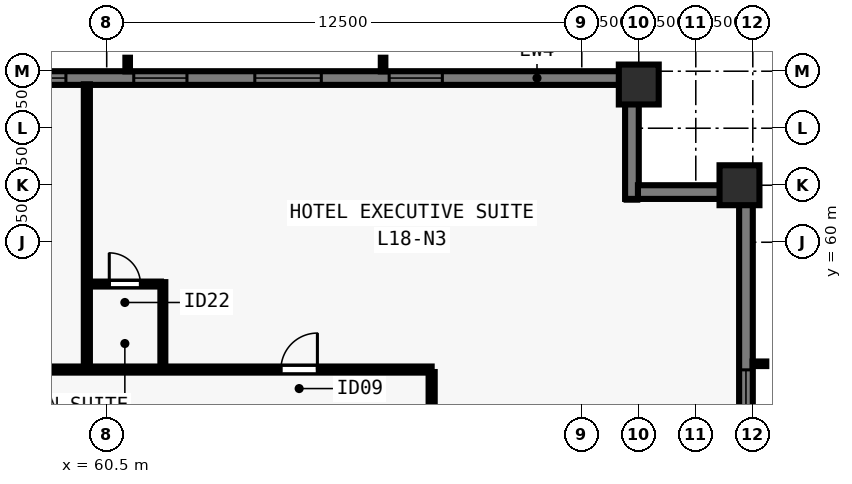
"""IFC4 building model, lengths in metres.
Left out: names, types, materials, properties, quantities, classifications, styles, units other than length and angle.
Written with IfcOpenShell. Run it as: python <this file> out.ifc"""

import sys

from ifc_helpers import new_model, si_unit, direction, frame, frame_2d, origin, origin_2d, place, context, subcontext, project, spatial, rectangle, extrude, element, fill, save


model = new_model("IFC4")
c1 = context("Model", 3, precision=1e-05, world=origin(), true_north=direction((0.0, 1.0)))
c2 = subcontext(c1, "Body", "Model", "MODEL_VIEW")
j1 = project(units=[si_unit("LENGTHUNIT", "METRE"), si_unit("PLANEANGLEUNIT", "RADIAN")], contexts=[c1])
p1 = place(None, origin())
s1 = spatial("IfcSite", under=j1, at=p1, CompositionType="ELEMENT")
p2 = place(p1, origin())
s2 = spatial("IfcBuilding", under=s1, at=p2, CompositionType="ELEMENT")
p3 = place(p2, frame((0.0, 0.0, 69.0)))
s3 = spatial("IfcBuildingStorey", under=s2, at=p3, CompositionType="ELEMENT", Elevation=69.0)
for number, where, z_axis, x_axis in (
    (1, (77.15, 61.5, 0.0), (0.0, 0.0, 1.0), (0.0, 1.0, 0.0)),
    (2, (74.5, 64.15, 0.0), (0.0, 0.0, 1.0), (1.0, 0.0, 0.0)),
):
    element("IfcColumn", number, at=place(p3, frame(where, z_axis=z_axis, x_axis=x_axis)), inside=s3, PredefinedType="COLUMN", context=c2, shape_type="SweptSolid", body=[
        extrude(rectangle(XDim=1.05, YDim=1.05, at=origin_2d()), origin(), (0.0, 0.0, 1.0), 3.5),
    ])
p4 = place(p3, frame((29.5, 64.32, 0.0), z_axis=(0.0, 0.0, 1.0), x_axis=(1.0, 0.0, 0.0)))
e3 = element("IfcWall", 3, at=p4, inside=s3, PredefinedType="SOLIDWALL", context=c2, shape_type="SweptSolid", body=[
    extrude(rectangle(XDim=44.662, YDim=0.36, at=frame_2d((22.331, 0.0))), origin(), (0.0, 0.0, 1.0), 3.28),
])
p5 = place(p4, frame((4.83, 0.0, 0.8)))
e4 = element("IfcOpeningElement", 4, at=p5, cuts=e3, PredefinedType="OPENING", context=c2, shape_type="SweptSolid", body=[
    extrude(rectangle(XDim=1.4, YDim=1.544, at=frame_2d((0.7, 0.772))), frame((0.0, 0.19, 0.0), z_axis=(0.0, -1.0, 0.0), x_axis=(1.0, 0.0, 0.0)), (0.0, 0.0, 1.0), 0.38),
])
p6 = place(p4, frame((8.015, 0.0, 0.8)))
e5 = element("IfcOpeningElement", 5, at=p6, cuts=e3, PredefinedType="OPENING", context=c2, shape_type="SweptSolid", body=[
    extrude(rectangle(XDim=1.75, YDim=1.544, at=frame_2d((0.875, 0.772))), frame((0.0, 0.19, 0.0), z_axis=(0.0, -1.0, 0.0), x_axis=(1.0, 0.0, 0.0)), (0.0, 0.0, 1.0), 0.38),
])
p7 = place(p4, frame((11.551, 0.0, 0.8)))
e6 = element("IfcOpeningElement", 6, at=p7, cuts=e3, PredefinedType="OPENING", context=c2, shape_type="SweptSolid", body=[
    extrude(rectangle(XDim=1.4, YDim=1.544, at=frame_2d((0.7, 0.772))), frame((0.0, 0.19, 0.0), z_axis=(0.0, -1.0, 0.0), x_axis=(1.0, 0.0, 0.0)), (0.0, 0.0, 1.0), 0.38),
])
p8 = place(p4, frame((15.186, 0.0, 0.8)))
e7 = element("IfcOpeningElement", 7, at=p8, cuts=e3, PredefinedType="OPENING", context=c2, shape_type="SweptSolid", body=[
    extrude(rectangle(XDim=1.75, YDim=1.544, at=frame_2d((0.875, 0.772))), frame((0.0, 0.19, 0.0), z_axis=(0.0, -1.0, 0.0), x_axis=(1.0, 0.0, 0.0)), (0.0, 0.0, 1.0), 0.38),
])
p9 = place(p4, frame((18.721, 0.0, 0.8)))
e8 = element("IfcOpeningElement", 8, at=p9, cuts=e3, PredefinedType="OPENING", context=c2, shape_type="SweptSolid", body=[
    extrude(rectangle(XDim=1.4, YDim=1.544, at=frame_2d((0.7, 0.772))), frame((0.0, 0.19, 0.0), z_axis=(0.0, -1.0, 0.0), x_axis=(1.0, 0.0, 0.0)), (0.0, 0.0, 1.0), 0.38),
])
p10 = place(p4, frame((21.456, 0.0, 0.8)))
e9 = element("IfcOpeningElement", 9, at=p10, cuts=e3, PredefinedType="OPENING", context=c2, shape_type="SweptSolid", body=[
    extrude(rectangle(XDim=1.75, YDim=1.544, at=frame_2d((0.875, 0.772))), frame((0.0, 0.19, 0.0), z_axis=(0.0, -1.0, 0.0), x_axis=(1.0, 0.0, 0.0)), (0.0, 0.0, 1.0), 0.38),
])
p11 = place(p4, frame((24.991, 0.0, 0.8)))
e10 = element("IfcOpeningElement", 10, at=p11, cuts=e3, PredefinedType="OPENING", context=c2, shape_type="SweptSolid", body=[
    extrude(rectangle(XDim=1.4, YDim=1.544, at=frame_2d((0.7, 0.772))), frame((0.0, 0.19, 0.0), z_axis=(0.0, -1.0, 0.0), x_axis=(1.0, 0.0, 0.0)), (0.0, 0.0, 1.0), 0.38),
])
p12 = place(p4, frame((28.177, 0.0, 0.8)))
e11 = element("IfcOpeningElement", 11, at=p12, cuts=e3, PredefinedType="OPENING", context=c2, shape_type="SweptSolid", body=[
    extrude(rectangle(XDim=1.75, YDim=1.544, at=frame_2d((0.875, 0.772))), frame((0.0, 0.19, 0.0), z_axis=(0.0, -1.0, 0.0), x_axis=(1.0, 0.0, 0.0)), (0.0, 0.0, 1.0), 0.38),
])
p13 = place(p4, frame((31.711, 0.0, 0.8)))
e12 = element("IfcOpeningElement", 12, at=p13, cuts=e3, PredefinedType="OPENING", context=c2, shape_type="SweptSolid", body=[
    extrude(rectangle(XDim=1.4, YDim=1.544, at=frame_2d((0.7, 0.772))), frame((0.0, 0.19, 0.0), z_axis=(0.0, -1.0, 0.0), x_axis=(1.0, 0.0, 0.0)), (0.0, 0.0, 1.0), 0.38),
])
p14 = place(p4, frame((34.897, 0.0, 0.8)))
e13 = element("IfcOpeningElement", 13, at=p14, cuts=e3, PredefinedType="OPENING", context=c2, shape_type="SweptSolid", body=[
    extrude(rectangle(XDim=1.75, YDim=1.544, at=frame_2d((0.875, 0.772))), frame((0.0, 0.19, 0.0), z_axis=(0.0, -1.0, 0.0), x_axis=(1.0, 0.0, 0.0)), (0.0, 0.0, 1.0), 0.38),
])
p15 = place(p4, frame((38.432, 0.0, 0.8)))
e14 = element("IfcOpeningElement", 14, at=p15, cuts=e3, PredefinedType="OPENING", context=c2, shape_type="SweptSolid", body=[
    extrude(rectangle(XDim=1.4, YDim=1.544, at=frame_2d((0.7, 0.772))), frame((0.0, 0.19, 0.0), z_axis=(0.0, -1.0, 0.0), x_axis=(1.0, 0.0, 0.0)), (0.0, 0.0, 1.0), 0.38),
])
p16 = place(p3, frame((74.32, 64.5, 0.0), z_axis=(0.0, 0.0, 1.0), x_axis=(0.0, -1.0, 0.0)))
e15 = element("IfcWall", 15, at=p16, inside=s3, PredefinedType="SOLIDWALL", context=c2, shape_type="SweptSolid", body=[
    extrude(rectangle(XDim=3.36, YDim=0.36, at=frame_2d((1.68, 0.0))), origin(), (0.0, 0.0, 1.0), 3.28),
])
p17 = place(p3, frame((74.478, 61.32, 0.0), z_axis=(0.0, 0.0, 1.0), x_axis=(1.0, 0.0, 0.0)))
e16 = element("IfcWall", 16, at=p17, inside=s3, PredefinedType="SOLIDWALL", context=c2, shape_type="SweptSolid", body=[
    extrude(rectangle(XDim=2.684, YDim=0.36, at=frame_2d((1.342, 0.0))), origin(), (0.0, 0.0, 1.0), 3.28),
])
p18 = place(p3, frame((77.32, 61.5, 0.0), z_axis=(0.0, 0.0, 1.0), x_axis=(0.0, -1.0, 0.0)))
e17 = element("IfcWall", 17, at=p18, inside=s3, PredefinedType="SOLIDWALL", context=c2, shape_type="SweptSolid", body=[
    extrude(rectangle(XDim=18.762, YDim=0.36, at=frame_2d((9.381, 0.0))), origin(), (0.0, 0.0, 1.0), 3.28),
])
p19 = place(p18, frame((4.858, 0.0, 0.8)))
e18 = element("IfcOpeningElement", 18, at=p19, cuts=e17, PredefinedType="OPENING", context=c2, shape_type="SweptSolid", body=[
    extrude(rectangle(XDim=1.4, YDim=1.544, at=frame_2d((0.7, 0.772))), frame((0.0, 0.19, 0.0), z_axis=(0.0, -1.0, 0.0), x_axis=(1.0, 0.0, 0.0)), (0.0, 0.0, 1.0), 0.38),
])
p20 = place(p18, frame((8.098, 0.0, 0.8)))
e19 = element("IfcOpeningElement", 19, at=p20, cuts=e17, PredefinedType="OPENING", context=c2, shape_type="SweptSolid", body=[
    extrude(rectangle(XDim=1.75, YDim=1.544, at=frame_2d((0.875, 0.772))), frame((0.0, 0.19, 0.0), z_axis=(0.0, -1.0, 0.0), x_axis=(1.0, 0.0, 0.0)), (0.0, 0.0, 1.0), 0.38),
])
p21 = place(p18, frame((11.689, 0.0, 0.8)))
e20 = element("IfcOpeningElement", 20, at=p21, cuts=e17, PredefinedType="OPENING", context=c2, shape_type="SweptSolid", body=[
    extrude(rectangle(XDim=1.4, YDim=1.544, at=frame_2d((0.7, 0.772))), frame((0.0, 0.19, 0.0), z_axis=(0.0, -1.0, 0.0), x_axis=(1.0, 0.0, 0.0)), (0.0, 0.0, 1.0), 0.38),
])
p22 = place(p18, frame((14.929, 0.0, 0.8)))
e21 = element("IfcOpeningElement", 21, at=p22, cuts=e17, PredefinedType="OPENING", context=c2, shape_type="SweptSolid", body=[
    extrude(rectangle(XDim=1.75, YDim=1.544, at=frame_2d((0.875, 0.772))), frame((0.0, 0.19, 0.0), z_axis=(0.0, -1.0, 0.0), x_axis=(1.0, 0.0, 0.0)), (0.0, 0.0, 1.0), 0.38),
])
p23 = place(p3, frame((34.95, 56.65, 0.0), z_axis=(0.0, 0.0, 1.0), x_axis=(1.0, 0.0, 0.0)))
e22 = element("IfcWall", 22, at=p23, inside=s3, PredefinedType="PARTITIONING", context=c2, shape_type="SweptSolid", body=[
    extrude(rectangle(XDim=34.1, YDim=0.16, at=frame_2d((17.05, 0.0))), origin(), (0.0, 0.0, 1.0), 3.28),
])
p24 = place(p23, frame((4.166, 0.0, 0.0)))
e23 = element("IfcOpeningElement", 23, at=p24, cuts=e22, PredefinedType="OPENING", context=c2, shape_type="SweptSolid", body=[
    extrude(rectangle(XDim=0.96, YDim=2.15, at=frame_2d((0.48, 1.075))), frame((0.0, 0.09, 0.0), z_axis=(0.0, -1.0, 0.0), x_axis=(1.0, 0.0, 0.0)), (0.0, 0.0, 1.0), 0.18),
])
p25 = place(p23, frame((17.73, 0.0, 0.0)))
e24 = element("IfcOpeningElement", 24, at=p25, cuts=e22, PredefinedType="OPENING", context=c2, shape_type="SweptSolid", body=[
    extrude(rectangle(XDim=0.96, YDim=2.15, at=frame_2d((0.48, 1.075))), frame((0.0, 0.09, 0.0), z_axis=(0.0, -1.0, 0.0), x_axis=(1.0, 0.0, 0.0)), (0.0, 0.0, 1.0), 0.18),
])
p26 = place(p23, frame((30.134, 0.0, 0.0)))
e25 = element("IfcOpeningElement", 25, at=p26, cuts=e22, PredefinedType="OPENING", context=c2, shape_type="SweptSolid", body=[
    extrude(rectangle(XDim=0.96, YDim=2.15, at=frame_2d((0.48, 1.075))), frame((0.0, 0.09, 0.0), z_axis=(0.0, -1.0, 0.0), x_axis=(1.0, 0.0, 0.0)), (0.0, 0.0, 1.0), 0.18),
])
p27 = place(p3, frame((69.05, 21.415, 0.0), z_axis=(0.0, 0.0, 1.0), x_axis=(0.0, 1.0, 0.0)))
e26 = element("IfcWall", 26, at=p27, inside=s3, PredefinedType="PARTITIONING", context=c2, shape_type="SweptSolid", body=[
    extrude(rectangle(XDim=35.17, YDim=0.16, at=frame_2d((17.585, 0.0))), origin(), (0.0, 0.0, 1.0), 3.28),
])
p28 = place(p27, frame((9.746, 0.0, 0.0)))
e27 = element("IfcOpeningElement", 27, at=p28, cuts=e26, PredefinedType="OPENING", context=c2, shape_type="SweptSolid", body=[
    extrude(rectangle(XDim=0.96, YDim=2.15, at=frame_2d((0.48, 1.075))), frame((0.0, 0.09, 0.0), z_axis=(0.0, -1.0, 0.0), x_axis=(1.0, 0.0, 0.0)), (0.0, 0.0, 1.0), 0.18),
])
p29 = place(p27, frame((27.146, 0.0, 0.0)))
e28 = element("IfcOpeningElement", 28, at=p29, cuts=e26, PredefinedType="OPENING", context=c2, shape_type="SweptSolid", body=[
    extrude(rectangle(XDim=0.96, YDim=2.15, at=frame_2d((0.48, 1.075))), frame((0.0, 0.09, 0.0), z_axis=(0.0, -1.0, 0.0), x_axis=(1.0, 0.0, 0.0)), (0.0, 0.0, 1.0), 0.18),
])
p30 = place(p3, frame((59.978, 56.715, 0.0), z_axis=(0.0, 0.0, 1.0), x_axis=(0.0, 1.0, 0.0)))
e29 = element("IfcWall", 29, at=p30, inside=s3, PredefinedType="PARTITIONING", context=c2, shape_type="SweptSolid", body=[
    extrude(rectangle(XDim=7.44, YDim=0.16, at=frame_2d((3.72, 0.0))), origin(), (0.0, 0.0, 1.0), 3.28),
])
p31 = place(p3, frame((61.978, 56.715, 0.0), z_axis=(0.0, 0.0, 1.0), x_axis=(0.0, 1.0, 0.0)))
e30 = element("IfcWall", 30, at=p31, inside=s3, PredefinedType="PLUMBINGWALL", context=c2, shape_type="SweptSolid", body=[
    extrude(rectangle(XDim=2.235, YDim=0.13, at=frame_2d((1.117, 0.0))), origin(), (0.0, 0.0, 1.0), 3.28),
])
p32 = place(p3, frame((60.042, 58.9, 0.0), z_axis=(0.0, 0.0, 1.0), x_axis=(1.0, 0.0, 0.0)))
e31 = element("IfcWall", 31, at=p32, inside=s3, PredefinedType="PLUMBINGWALL", context=c2, shape_type="SweptSolid", body=[
    extrude(rectangle(XDim=1.885, YDim=0.13, at=frame_2d((0.942, 0.0))), origin(), (0.0, 0.0, 1.0), 3.28),
])
p33 = place(p32, frame((0.525, 0.0, 0.0)))
e32 = element("IfcOpeningElement", 32, at=p33, cuts=e31, PredefinedType="OPENING", context=c2, shape_type="SweptSolid", body=[
    extrude(rectangle(XDim=0.82, YDim=2.1, at=frame_2d((0.41, 1.05))), frame((0.0, 0.075, 0.0), z_axis=(0.0, -1.0, 0.0), x_axis=(1.0, 0.0, 0.0)), (0.0, 0.0, 1.0), 0.15),
])
p34 = place(p12, origin())
e33 = element("IfcWindow", 33, at=p34, inside=s3, PartitioningType="SINGLE_PANEL", PredefinedType="WINDOW", context=c2, shape_type="SweptSolid", body=[
    extrude(rectangle(XDim=1.75, YDim=1.544, at=frame_2d((0.875, 0.772))), frame((0.0, -0.05, 0.0), z_axis=(0.0, -1.0, 0.0), x_axis=(1.0, 0.0, 0.0)), (0.0, 0.0, 1.0), 0.06),
])
fill(e11, e33)
p35 = place(p13, origin())
e34 = element("IfcWindow", 34, at=p35, inside=s3, PartitioningType="SINGLE_PANEL", PredefinedType="WINDOW", context=c2, shape_type="SweptSolid", body=[
    extrude(rectangle(XDim=1.4, YDim=1.544, at=frame_2d((0.7, 0.772))), frame((0.0, -0.05, 0.0), z_axis=(0.0, -1.0, 0.0), x_axis=(1.0, 0.0, 0.0)), (0.0, 0.0, 1.0), 0.06),
])
fill(e12, e34)
p36 = place(p14, origin())
e35 = element("IfcWindow", 35, at=p36, inside=s3, PartitioningType="SINGLE_PANEL", PredefinedType="WINDOW", context=c2, shape_type="SweptSolid", body=[
    extrude(rectangle(XDim=1.75, YDim=1.544, at=frame_2d((0.875, 0.772))), frame((0.0, -0.05, 0.0), z_axis=(0.0, -1.0, 0.0), x_axis=(1.0, 0.0, 0.0)), (0.0, 0.0, 1.0), 0.06),
])
fill(e13, e35)
p37 = place(p15, origin())
e36 = element("IfcWindow", 36, at=p37, inside=s3, PartitioningType="SINGLE_PANEL", PredefinedType="WINDOW", context=c2, shape_type="SweptSolid", body=[
    extrude(rectangle(XDim=1.4, YDim=1.544, at=frame_2d((0.7, 0.772))), frame((0.0, -0.05, 0.0), z_axis=(0.0, -1.0, 0.0), x_axis=(1.0, 0.0, 0.0)), (0.0, 0.0, 1.0), 0.06),
])
fill(e14, e36)
p38 = place(p19, origin())
e37 = element("IfcWindow", 37, at=p38, inside=s3, PartitioningType="SINGLE_PANEL", PredefinedType="WINDOW", context=c2, shape_type="SweptSolid", body=[
    extrude(rectangle(XDim=1.4, YDim=1.544, at=frame_2d((0.7, 0.772))), frame((0.0, -0.05, 0.0), z_axis=(0.0, -1.0, 0.0), x_axis=(1.0, 0.0, 0.0)), (0.0, 0.0, 1.0), 0.06),
])
fill(e18, e37)
p39 = place(p33, origin())
e38 = element("IfcDoor", 38, at=p39, inside=s3, OperationType="SINGLE_SWING_LEFT", PredefinedType="DOOR", context=c2, shape_type="SweptSolid", body=[
    extrude(rectangle(XDim=0.82, YDim=2.1, at=frame_2d((0.41, 1.05))), frame((0.0, 0.025, 0.0), z_axis=(0.0, -1.0, 0.0), x_axis=(1.0, 0.0, 0.0)), (0.0, 0.0, 1.0), 0.05),
])
fill(e32, e38)
p40 = place(p26, origin())
e39 = element("IfcDoor", 39, at=p40, inside=s3, OperationType="SINGLE_SWING_RIGHT", PredefinedType="DOOR", context=c2, shape_type="SweptSolid", body=[
    extrude(rectangle(XDim=0.96, YDim=2.15, at=frame_2d((0.48, 1.075))), frame((0.0, 0.025, 0.0), z_axis=(0.0, -1.0, 0.0), x_axis=(1.0, 0.0, 0.0)), (0.0, 0.0, 1.0), 0.05),
])
fill(e25, e39)
save(model, sys.argv[1])
